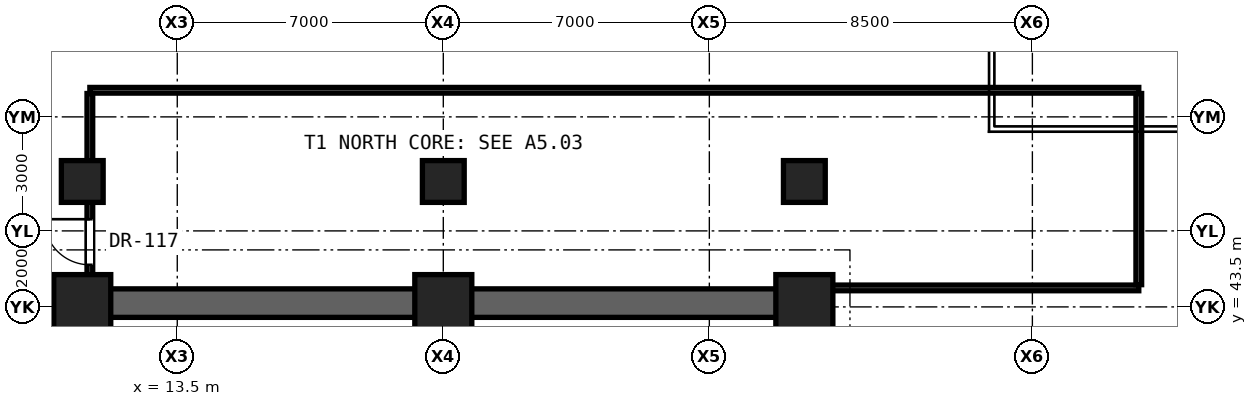
"""IFC4 building model, lengths in metres.
Left out: names, types, materials, properties, quantities, classifications, styles, units other than length and angle.
Written with IfcOpenShell. Run it as: python <this file> out.ifc"""

import sys

from ifc_helpers import new_model, si_unit, direction, frame, frame_2d, origin, origin_2d, place, context, subcontext, project, spatial, rectangle, extrude, element, fill, save


model = new_model("IFC4")
c1 = context("Model", 3, precision=1e-05, world=origin(), true_north=direction((0.0, 1.0)))
c2 = subcontext(c1, "Body", "Model", "MODEL_VIEW")
j1 = project(units=[si_unit("LENGTHUNIT", "METRE"), si_unit("PLANEANGLEUNIT", "RADIAN")], contexts=[c1])
p1 = place(None, origin())
s1 = spatial("IfcSite", under=j1, at=p1, CompositionType="ELEMENT")
p2 = place(p1, origin())
s2 = spatial("IfcBuilding", under=s1, at=p2, CompositionType="ELEMENT")
p3 = place(p2, frame((0.0, 0.0, 5.2)))
s3 = spatial("IfcBuildingStorey", under=s2, at=p3, CompositionType="ELEMENT", Elevation=5.2)
for number, where, z_axis, x_axis in (
    (1, (11.0, 43.6, 0.0), (0.0, 0.0, 1.0), (1.0, 0.0, 0.0)),
    (2, (20.5, 43.6, 0.0), (0.0, 0.0, 1.0), (1.0, 0.0, 0.0)),
    (3, (30.0, 43.6, 0.0), (0.0, 0.0, 1.0), (1.0, 0.0, 0.0)),
):
    element("IfcColumn", number, at=place(p3, frame(where, z_axis=z_axis, x_axis=x_axis)), inside=s3, PredefinedType="COLUMN", context=c2, shape_type="SweptSolid", body=[
        extrude(rectangle(XDim=1.5, YDim=1.5, at=origin_2d()), origin(), (0.0, 0.0, 1.0), 4.3),
    ])
p4 = place(p3, frame((11.0, 43.6, 0.0), z_axis=(0.0, 0.0, 1.0), x_axis=(1.0, 0.0, 0.0)))
e4 = element("IfcWall", 4, at=p4, inside=s3, PredefinedType="SHEAR", context=c2, shape_type="SweptSolid", body=[
    extrude(rectangle(XDim=19.0, YDim=0.75, at=frame_2d((9.5, 0.0))), origin(), (0.0, 0.0, 1.0), 3.98),
])
for number, where, z_axis, x_axis in (
    (5, (11.0, 37.6, 0.0), (0.0, 0.0, 1.0), (0.0, 1.0, 0.0)),
    (6, (30.0, 37.6, 0.0), (0.0, 0.0, 1.0), (0.0, 1.0, 0.0)),
):
    element("IfcWall", number, at=place(p3, frame(where, z_axis=z_axis, x_axis=x_axis)), inside=s3, PredefinedType="SHEAR", context=c2, shape_type="SweptSolid", body=[
        extrude(rectangle(XDim=6.0, YDim=0.75, at=frame_2d((3.0, 0.0))), origin(), (0.0, 0.0, 1.0), 3.98),
    ])
for number, where, z_axis, x_axis in (
    (7, (11.0, 46.8, 0.0), (0.0, 0.0, 1.0), (1.0, 0.0, 0.0)),
    (8, (20.5, 46.8, 0.0), (0.0, 0.0, 1.0), (1.0, 0.0, 0.0)),
    (9, (30.0, 46.8, 0.0), (0.0, 0.0, 1.0), (1.0, 0.0, 0.0)),
):
    element("IfcColumn", number, at=place(p3, frame(where, z_axis=z_axis, x_axis=x_axis)), inside=s3, PredefinedType="COLUMN", context=c2, shape_type="SweptSolid", body=[
        extrude(rectangle(XDim=1.1, YDim=1.1, at=origin_2d()), origin(), (0.0, 0.0, 1.0), 4.3),
    ])
p5 = place(p3, frame((30.02, 44.0, 0.0), z_axis=(0.0, 0.0, 1.0), x_axis=(1.0, 0.0, 0.0)))
e10 = element("IfcWall", 10, at=p5, inside=s3, PredefinedType="PARTITIONING", context=c2, shape_type="SweptSolid", body=[
    extrude(rectangle(XDim=8.78, YDim=0.15, at=frame_2d((4.39, 0.0))), origin(), (0.0, 0.0, 1.0), 3.199),
])
p6 = place(p3, frame((11.2, 49.2, 0.0), z_axis=(0.0, 0.0, 1.0), x_axis=(1.0, 0.0, 0.0)))
e11 = element("IfcWall", 11, at=p6, inside=s3, PredefinedType="PARTITIONING", context=c2, shape_type="SweptSolid", body=[
    extrude(rectangle(XDim=27.6, YDim=0.15, at=frame_2d((13.8, 0.0))), origin(), (0.0, 0.0, 1.0), 3.98),
])
p7 = place(p3, frame((11.2, 44.0, 0.0), z_axis=(0.0, 0.0, 1.0), x_axis=(0.0, 1.0, 0.0)))
e12 = element("IfcWall", 12, at=p7, inside=s3, PredefinedType="PARTITIONING", context=c2, shape_type="SweptSolid", body=[
    extrude(rectangle(XDim=5.115, YDim=0.15, at=frame_2d((2.558, 0.0))), origin(), (0.0, 0.0, 1.0), 3.199),
])
p8 = place(p7, frame((0.607, 0.0, 0.0)))
e13 = element("IfcOpeningElement", 13, at=p8, cuts=e12, PredefinedType="OPENING", context=c2, shape_type="SweptSolid", body=[
    extrude(rectangle(XDim=1.2, YDim=2.25, at=frame_2d((0.6, 1.125))), frame((0.0, 0.085, 0.0), z_axis=(0.0, -1.0, 0.0), x_axis=(1.0, 0.0, 0.0)), (0.0, 0.0, 1.0), 0.17),
])
p9 = place(p3, frame((38.8, 44.085, 0.0), z_axis=(0.0, 0.0, 1.0), x_axis=(0.0, 1.0, 0.0)))
e14 = element("IfcWall", 14, at=p9, inside=s3, PredefinedType="PARTITIONING", context=c2, shape_type="SweptSolid", body=[
    extrude(rectangle(XDim=5.03, YDim=0.15, at=frame_2d((2.515, 0.0))), origin(), (0.0, 0.0, 1.0), 3.199),
])
p10 = place(p8, origin())
e15 = element("IfcDoor", 15, at=p10, inside=s3, OperationType="SINGLE_SWING_RIGHT", PredefinedType="DOOR", context=c2, shape_type="SweptSolid", body=[
    extrude(rectangle(XDim=1.2, YDim=2.25, at=frame_2d((0.6, 1.125))), frame((0.0, 0.025, 0.0), z_axis=(0.0, -1.0, 0.0), x_axis=(1.0, 0.0, 0.0)), (0.0, 0.0, 1.0), 0.05),
])
fill(e13, e15)
save(model, sys.argv[1])
